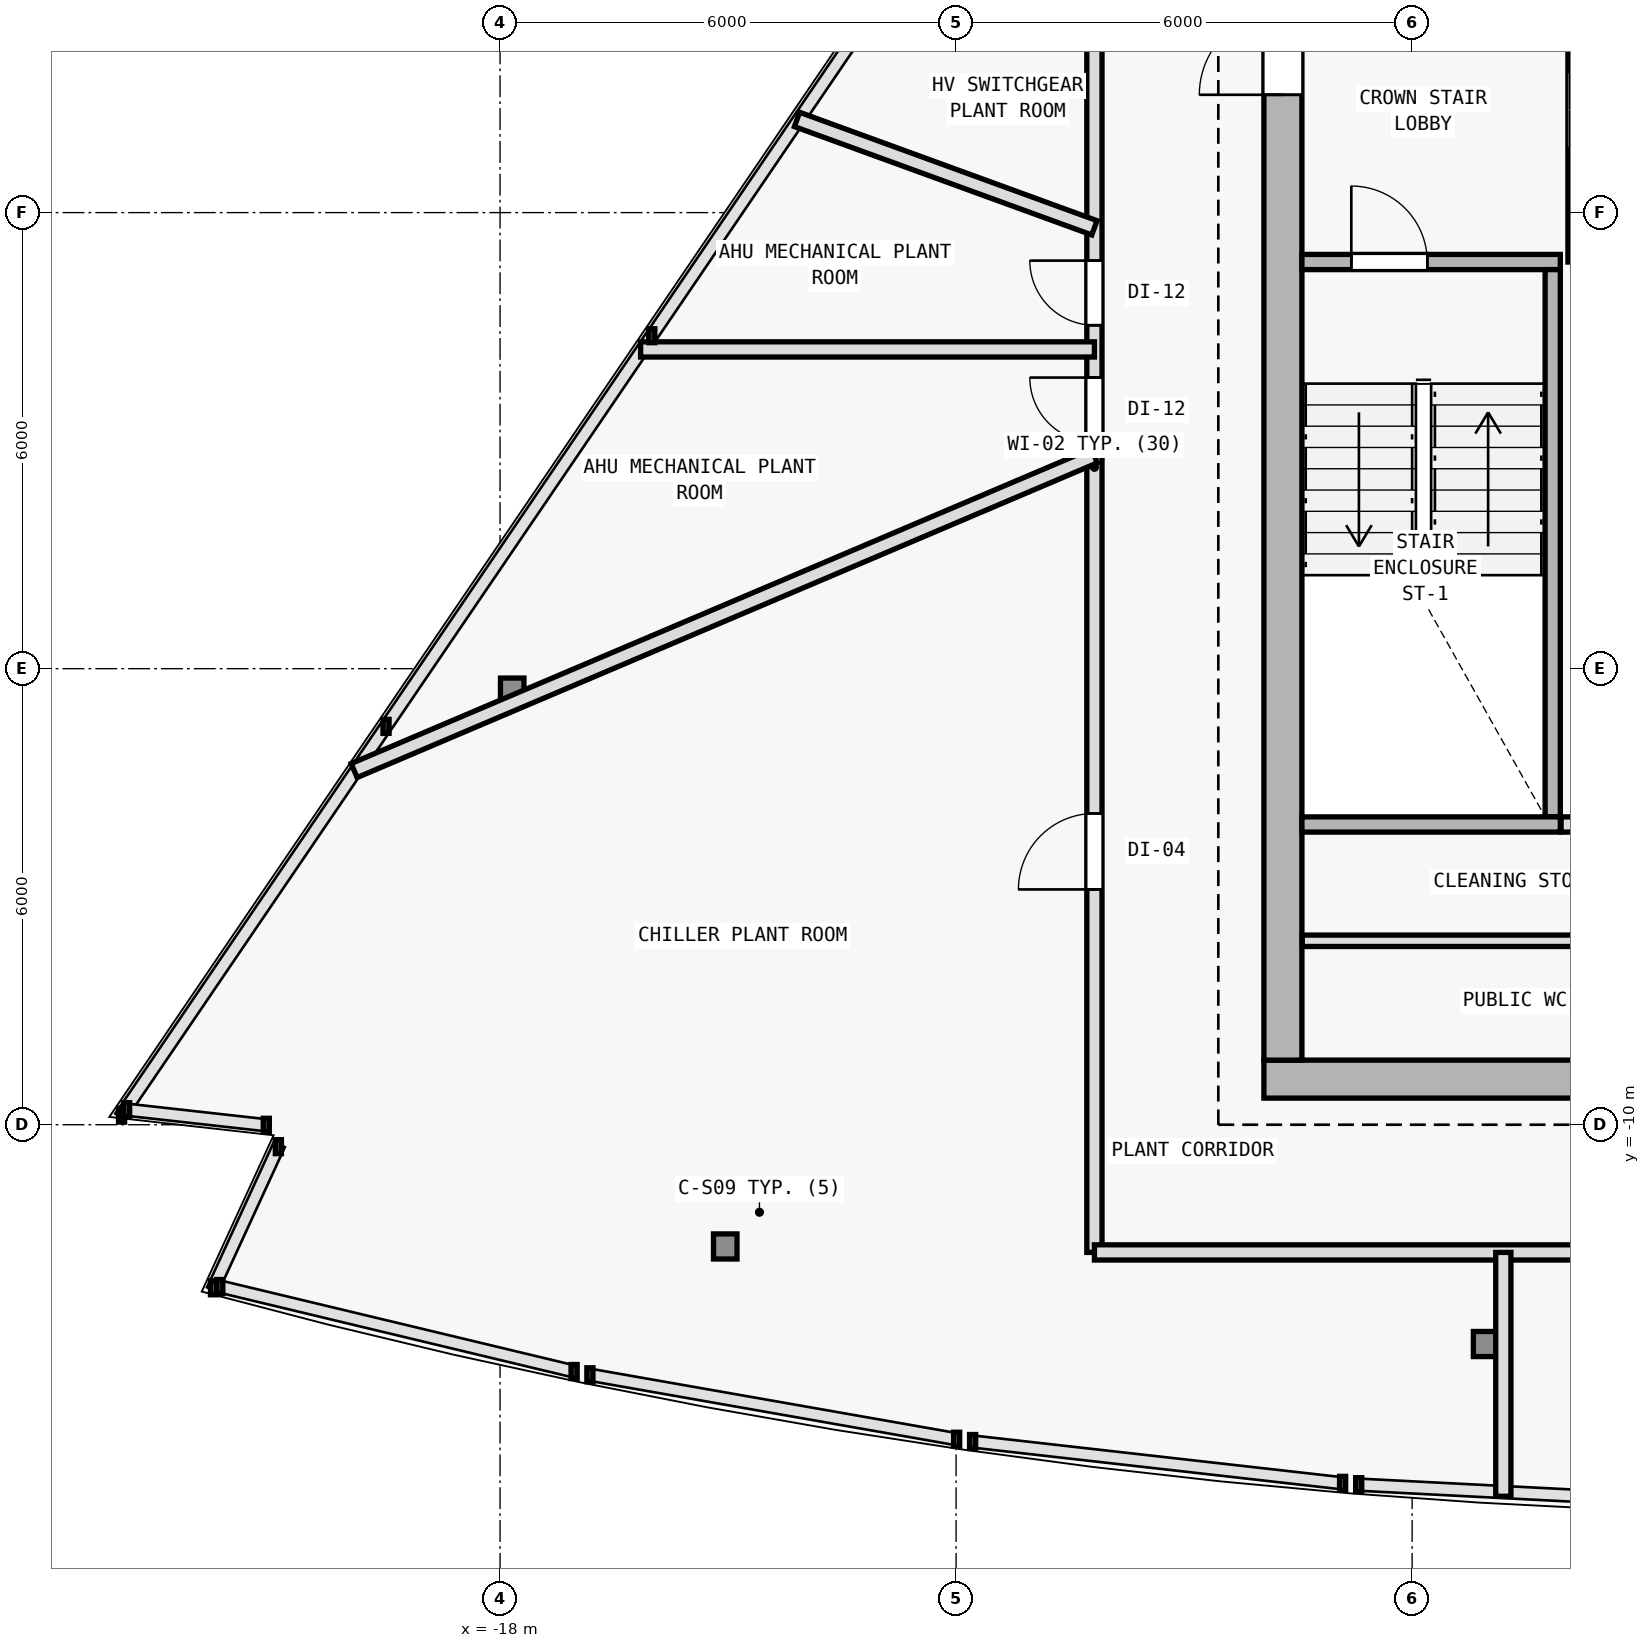
"""IFC4 building model, lengths in metres.
Left out: names, types, materials, properties, quantities, classifications, styles, units other than length and angle.
Written with IfcOpenShell. Run it as: python <this file> out.ifc"""

import sys

from ifc_helpers import new_model, si_unit, direction, frame, frame_2d, origin, origin_2d, place, context, subcontext, project, spatial, rectangle, i_section, extrude, element, fill, save


model = new_model("IFC4")
c1 = context("Model", 3, precision=1e-05, world=origin(), true_north=direction((0.0, 1.0)))
c2 = subcontext(c1, "Body", "Model", "MODEL_VIEW")
j1 = project(units=[si_unit("LENGTHUNIT", "METRE"), si_unit("PLANEANGLEUNIT", "RADIAN")], contexts=[c1])
p1 = place(None, origin())
s1 = spatial("IfcSite", under=j1, at=p1, CompositionType="ELEMENT")
p2 = place(p1, origin())
s2 = spatial("IfcBuilding", under=s1, at=p2, CompositionType="ELEMENT")
p3 = place(p2, frame((0.0, 0.0, 304.8)))
s3 = spatial("IfcBuildingStorey", under=s2, at=p3, CompositionType="ELEMENT", Elevation=304.8)
for number, where, z_axis, x_axis in (
    (1, (-7.7, -9.4, 0.0), (0.0, 0.0, 1.0), (1.0, 0.0, 0.0)),
    (2, (-7.7, 2.0, 0.0), (0.0, 0.0, 1.0), (1.0, 0.0, 0.0)),
):
    element("IfcColumn", number, at=place(p3, frame(where, z_axis=z_axis, x_axis=x_axis)), inside=s3, PredefinedType="COLUMN", context=c2, shape_type="SweptSolid", body=[
        extrude(i_section(OverallWidth=0.374, OverallDepth=0.372, WebThickness=0.012, FlangeThickness=0.02, FilletRadius=0.015, at=origin_2d()), origin(), (0.0, 0.0, 1.0), 3.6),
    ])
for number, where, z_axis, x_axis in (
    (3, (-15.037, -11.602, 0.0), (0.0, 0.0, 1.0), (1.0, 0.0, 0.0)),
    (4, (-5.04, -12.885, 0.0), (0.0, 0.0, 1.0), (1.0, 0.0, 0.0)),
    (5, (-17.84, -4.289, 0.0), (0.0, 0.0, 1.0), (1.0, 0.0, 0.0)),
):
    element("IfcColumn", number, at=place(p3, frame(where, z_axis=z_axis, x_axis=x_axis)), inside=s3, PredefinedType="COLUMN", context=c2, shape_type="SweptSolid", body=[
        extrude(i_section(OverallWidth=0.309, OverallDepth=0.33, WebThickness=0.011, FlangeThickness=0.019, FilletRadius=0.027, at=origin_2d()), origin(), (0.0, 0.0, 1.0), 3.6),
    ])
p4 = place(p3, frame((-7.95, -9.4, 0.0), z_axis=(0.0, 0.0, 1.0), x_axis=(1.0, 0.0, 0.0)))
e6 = element("IfcWall", 6, at=p4, inside=s3, PredefinedType="SHEAR", context=c2, shape_type="SweptSolid", body=[
    extrude(rectangle(XDim=15.9, YDim=0.5, at=frame_2d((7.95, 0.0))), origin(), (0.0, 0.0, 1.0), 3.34),
])
p5 = place(p4, frame((9.6, 0.0, 0.0)))
e7 = element("IfcOpeningElement", 7, at=p5, cuts=e6, PredefinedType="OPENING", context=c2, shape_type="SweptSolid", body=[
    extrude(rectangle(XDim=1.5, YDim=2.2, at=frame_2d((0.75, 1.1))), frame((0.0, 0.26, 0.0), z_axis=(0.0, -1.0, 0.0), x_axis=(1.0, 0.0, 0.0)), (0.0, 0.0, 1.0), 0.52),
])
p6 = place(p3, frame((-7.7, -9.15, 0.0), z_axis=(0.0, 0.0, 1.0), x_axis=(0.0, 1.0, 0.0)))
e8 = element("IfcWall", 8, at=p6, inside=s3, PredefinedType="SHEAR", context=c2, shape_type="SweptSolid", body=[
    extrude(rectangle(XDim=19.1, YDim=0.5, at=frame_2d((9.55, 0.0))), origin(), (0.0, 0.0, 1.0), 3.34),
])
p7 = place(p6, frame((12.7, 0.0, 0.0)))
e9 = element("IfcOpeningElement", 9, at=p7, cuts=e8, PredefinedType="OPENING", context=c2, shape_type="SweptSolid", body=[
    extrude(rectangle(XDim=1.1, YDim=2.15, at=frame_2d((0.55, 1.075))), frame((0.0, 0.26, 0.0), z_axis=(0.0, -1.0, 0.0), x_axis=(1.0, 0.0, 0.0)), (0.0, 0.0, 1.0), 0.52),
])
p8 = place(p3, frame((-7.45, 1.35, 0.0), z_axis=(0.0, 0.0, 1.0), x_axis=(1.0, 0.0, 0.0)))
e10 = element("IfcWall", 10, at=p8, inside=s3, PredefinedType="SOLIDWALL", context=c2, shape_type="SweptSolid", body=[
    extrude(rectangle(XDim=3.4, YDim=0.2, at=frame_2d((1.7, 0.0))), origin(), (0.0, 0.0, 1.0), 3.34),
])
p9 = place(p8, frame((0.65, 0.0, 0.0)))
e11 = element("IfcOpeningElement", 11, at=p9, cuts=e10, PredefinedType="OPENING", context=c2, shape_type="SweptSolid", body=[
    extrude(rectangle(XDim=1.0, YDim=2.15, at=frame_2d((0.5, 1.075))), frame((0.0, 0.11, 0.0), z_axis=(0.0, -1.0, 0.0), x_axis=(1.0, 0.0, 0.0)), (0.0, 0.0, 1.0), 0.22),
])
p10 = place(p3, frame((-4.15, -5.95, 0.0), z_axis=(0.0, 0.0, 1.0), x_axis=(0.0, 1.0, 0.0)))
e12 = element("IfcWall", 12, at=p10, inside=s3, PredefinedType="SOLIDWALL", context=c2, shape_type="SweptSolid", body=[
    extrude(rectangle(XDim=7.2, YDim=0.2, at=frame_2d((3.6, 0.0))), origin(), (0.0, 0.0, 1.0), 3.34),
])
p11 = place(p3, frame((-3.85, 1.35, 0.0), z_axis=(0.0, 0.0, 1.0), x_axis=(0.0, 1.0, 0.0)))
e13 = element("IfcWall", 13, at=p11, inside=s3, PredefinedType="SOLIDWALL", context=c2, shape_type="SweptSolid", body=[
    extrude(rectangle(XDim=8.595, YDim=0.2, at=frame_2d((4.297, 0.0))), origin(), (0.0, 0.0, 1.0), 3.34),
])
p12 = place(p11, frame((1.5, 0.0, 0.0)))
e14 = element("IfcOpeningElement", 14, at=p12, cuts=e13, PredefinedType="OPENING", context=c2, shape_type="SweptSolid", body=[
    extrude(rectangle(XDim=1.0, YDim=2.15, at=frame_2d((0.5, 1.075))), frame((0.0, 0.11, 0.0), z_axis=(0.0, -1.0, 0.0), x_axis=(1.0, 0.0, 0.0)), (0.0, 0.0, 1.0), 0.22),
])
p13 = place(p11, frame((3.18, 0.0, 0.0)))
e15 = element("IfcOpeningElement", 15, at=p13, cuts=e13, PredefinedType="OPENING", context=c2, shape_type="SweptSolid", body=[
    extrude(rectangle(XDim=1.0, YDim=2.15, at=frame_2d((0.5, 1.075))), frame((0.0, 0.11, 0.0), z_axis=(0.0, -1.0, 0.0), x_axis=(1.0, 0.0, 0.0)), (0.0, 0.0, 1.0), 0.22),
])
p14 = place(p3, frame((-7.45, -6.05, 0.0), z_axis=(0.0, 0.0, 1.0), x_axis=(1.0, 0.0, 0.0)))
e16 = element("IfcWall", 16, at=p14, inside=s3, PredefinedType="SOLIDWALL", context=c2, shape_type="SweptSolid", body=[
    extrude(rectangle(XDim=3.4, YDim=0.2, at=frame_2d((1.7, 0.0))), origin(), (0.0, 0.0, 1.0), 3.34),
])
p15 = place(p3, frame((-4.04, -6.05, 0.0), z_axis=(0.0, 0.0, 1.0), x_axis=(1.0, 0.0, 0.0)))
e17 = element("IfcWall", 17, at=p15, inside=s3, PredefinedType="SOLIDWALL", context=c2, shape_type="SweptSolid", body=[
    extrude(rectangle(XDim=2.79, YDim=0.2, at=frame_2d((1.395, 0.0))), origin(), (0.0, 0.0, 1.0), 3.34),
])
p16 = place(p3, frame((-7.445, -7.58, 0.0), z_axis=(0.0, 0.0, 1.0), x_axis=(1.0, 0.0, 0.0)))
e18 = element("IfcWall", 18, at=p16, inside=s3, PredefinedType="PARTITIONING", context=c2, shape_type="SweptSolid", body=[
    extrude(rectangle(XDim=6.195, YDim=0.15, at=frame_2d((3.098, 0.0))), origin(), (0.0, 0.0, 1.0), 3.34),
])
p17 = place(p3, frame((-10.18, -11.68, 0.0), z_axis=(0.0, 0.0, 1.0), x_axis=(0.0, 1.0, 0.0)))
e19 = element("IfcWall", 19, at=p17, inside=s3, PredefinedType="SOLIDWALL", context=c2, shape_type="SweptSolid", body=[
    extrude(rectangle(XDim=20.657, YDim=0.2, at=frame_2d((10.329, 0.0))), origin(), (0.0, 0.0, 1.0), 2.995),
])
p18 = place(p17, frame((10.66, 0.0, 0.0)))
e20 = element("IfcOpeningElement", 20, at=p18, cuts=e19, PredefinedType="OPENING", context=c2, shape_type="SweptSolid", body=[
    extrude(rectangle(XDim=0.85, YDim=2.1, at=frame_2d((0.425, 1.05))), frame((0.0, 0.11, 0.0), z_axis=(0.0, -1.0, 0.0), x_axis=(1.0, 0.0, 0.0)), (0.0, 0.0, 1.0), 0.22),
])
p19 = place(p17, frame((4.776, 0.0, 0.0)))
e21 = element("IfcOpeningElement", 21, at=p19, cuts=e19, PredefinedType="OPENING", context=c2, shape_type="SweptSolid", body=[
    extrude(rectangle(XDim=1.0, YDim=2.15, at=frame_2d((0.5, 1.075))), frame((0.0, 0.11, 0.0), z_axis=(0.0, -1.0, 0.0), x_axis=(1.0, 0.0, 0.0)), (0.0, 0.0, 1.0), 0.22),
])
p20 = place(p17, frame((16.528, 0.0, 0.0)))
e22 = element("IfcOpeningElement", 22, at=p20, cuts=e19, PredefinedType="OPENING", context=c2, shape_type="SweptSolid", body=[
    extrude(rectangle(XDim=1.0, YDim=2.15, at=frame_2d((0.5, 1.075))), frame((0.0, 0.11, 0.0), z_axis=(0.0, -1.0, 0.0), x_axis=(1.0, 0.0, 0.0)), (0.0, 0.0, 1.0), 0.22),
])
p21 = place(p17, frame((12.198, 0.0, 0.0)))
e23 = element("IfcOpeningElement", 23, at=p21, cuts=e19, PredefinedType="OPENING", context=c2, shape_type="SweptSolid", body=[
    extrude(rectangle(XDim=0.85, YDim=2.1, at=frame_2d((0.425, 1.05))), frame((0.0, 0.11, 0.0), z_axis=(0.0, -1.0, 0.0), x_axis=(1.0, 0.0, 0.0)), (0.0, 0.0, 1.0), 0.22),
])
p22 = place(p3, frame((-10.18, -11.68, 0.0), z_axis=(0.0, 0.0, 1.0), x_axis=(1.0, 0.0, 0.0)))
e24 = element("IfcWall", 24, at=p22, inside=s3, PredefinedType="SOLIDWALL", context=c2, shape_type="SweptSolid", body=[
    extrude(rectangle(XDim=18.13, YDim=0.2, at=frame_2d((9.065, 0.0))), origin(), (0.0, 0.0, 1.0), 2.995),
])
p23 = place(p22, frame((8.58, 0.0, 0.0)))
e25 = element("IfcOpeningElement", 25, at=p23, cuts=e24, PredefinedType="OPENING", context=c2, shape_type="SweptSolid", body=[
    extrude(rectangle(XDim=1.0, YDim=2.15, at=frame_2d((0.5, 1.075))), frame((0.0, 0.11, 0.0), z_axis=(0.0, -1.0, 0.0), x_axis=(1.0, 0.0, 0.0)), (0.0, 0.0, 1.0), 0.22),
])
p24 = place(p22, frame((14.889, 0.0, 0.0)))
e26 = element("IfcOpeningElement", 26, at=p24, cuts=e24, PredefinedType="OPENING", context=c2, shape_type="SweptSolid", body=[
    extrude(rectangle(XDim=1.0, YDim=2.15, at=frame_2d((0.5, 1.075))), frame((0.0, 0.11, 0.0), z_axis=(0.0, -1.0, 0.0), x_axis=(1.0, 0.0, 0.0)), (0.0, 0.0, 1.0), 0.22),
])
p25 = place(p3, frame((-19.92, -5.34, 0.0), z_axis=(0.0, 0.0, 1.0), x_axis=(0.920300813667, 0.391211467577, 0.0)))
e27 = element("IfcWall", 27, at=p25, inside=s3, PredefinedType="SOLIDWALL", context=c2, shape_type="SweptSolid", body=[
    extrude(rectangle(XDim=10.583, YDim=0.2, at=frame_2d((5.292, 0.0))), origin(), (0.0, 0.0, 1.0), 2.995),
])
p26 = place(p3, frame((-14.093, 3.226, 0.0), z_axis=(0.0, 0.0, 1.0), x_axis=(0.939579266893, -0.342331420154, 0.0)))
e28 = element("IfcWall", 28, at=p26, inside=s3, PredefinedType="SOLIDWALL", context=c2, shape_type="SweptSolid", body=[
    extrude(rectangle(XDim=4.164, YDim=0.2, at=frame_2d((2.082, 0.0))), origin(), (0.0, 0.0, 1.0), 3.34),
])
p27 = place(p3, frame((-16.151, 0.2, 0.0), z_axis=(0.0, 0.0, 1.0), x_axis=(1.0, 0.0, 0.0)))
e29 = element("IfcWall", 29, at=p27, inside=s3, PredefinedType="SOLIDWALL", context=c2, shape_type="SweptSolid", body=[
    extrude(rectangle(XDim=5.971, YDim=0.2, at=frame_2d((2.985, 0.0))), origin(), (0.0, 0.0, 1.0), 3.34),
])
p28 = place(p3, frame((-4.8, -14.888, 0.0), z_axis=(0.0, 0.0, 1.0), x_axis=(0.0, 1.0, 0.0)))
e30 = element("IfcWall", 30, at=p28, inside=s3, PredefinedType="SOLIDWALL", context=c2, shape_type="SweptSolid", body=[
    extrude(rectangle(XDim=3.208, YDim=0.2, at=frame_2d((1.604, 0.0))), origin(), (0.0, 0.0, 1.0), 2.995),
])
p29 = place(p7, origin())
e31 = element("IfcDoor", 31, at=p29, inside=s3, OperationType="SINGLE_SWING_LEFT", PredefinedType="DOOR", context=c2, shape_type="SweptSolid", body=[
    extrude(rectangle(XDim=1.1, YDim=2.15, at=frame_2d((0.55, 1.075))), frame((0.0, 0.025, 0.0), z_axis=(0.0, -1.0, 0.0), x_axis=(1.0, 0.0, 0.0)), (0.0, 0.0, 1.0), 0.05),
])
fill(e9, e31)
p30 = place(p9, origin())
e32 = element("IfcDoor", 32, at=p30, inside=s3, OperationType="SINGLE_SWING_LEFT", PredefinedType="DOOR", context=c2, shape_type="SweptSolid", body=[
    extrude(rectangle(XDim=1.0, YDim=2.15, at=frame_2d((0.5, 1.075))), frame((0.0, 0.025, 0.0), z_axis=(0.0, -1.0, 0.0), x_axis=(1.0, 0.0, 0.0)), (0.0, 0.0, 1.0), 0.05),
])
fill(e11, e32)
p31 = place(p18, origin())
e33 = element("IfcDoor", 33, at=p31, inside=s3, OperationType="SINGLE_SWING_RIGHT", PredefinedType="DOOR", context=c2, shape_type="SweptSolid", body=[
    extrude(rectangle(XDim=0.85, YDim=2.1, at=frame_2d((0.425, 1.05))), frame((0.0, 0.025, 0.0), z_axis=(0.0, -1.0, 0.0), x_axis=(1.0, 0.0, 0.0)), (0.0, 0.0, 1.0), 0.05),
])
fill(e20, e33)
p32 = place(p19, origin())
e34 = element("IfcDoor", 34, at=p32, inside=s3, OperationType="SINGLE_SWING_LEFT", PredefinedType="DOOR", context=c2, shape_type="SweptSolid", body=[
    extrude(rectangle(XDim=1.0, YDim=2.15, at=frame_2d((0.5, 1.075))), frame((0.0, 0.025, 0.0), z_axis=(0.0, -1.0, 0.0), x_axis=(1.0, 0.0, 0.0)), (0.0, 0.0, 1.0), 0.05),
])
fill(e21, e34)
p33 = place(p21, origin())
e35 = element("IfcDoor", 35, at=p33, inside=s3, OperationType="SINGLE_SWING_RIGHT", PredefinedType="DOOR", context=c2, shape_type="SweptSolid", body=[
    extrude(rectangle(XDim=0.85, YDim=2.1, at=frame_2d((0.425, 1.05))), frame((0.0, 0.025, 0.0), z_axis=(0.0, -1.0, 0.0), x_axis=(1.0, 0.0, 0.0)), (0.0, 0.0, 1.0), 0.05),
])
fill(e23, e35)
save(model, sys.argv[1])
